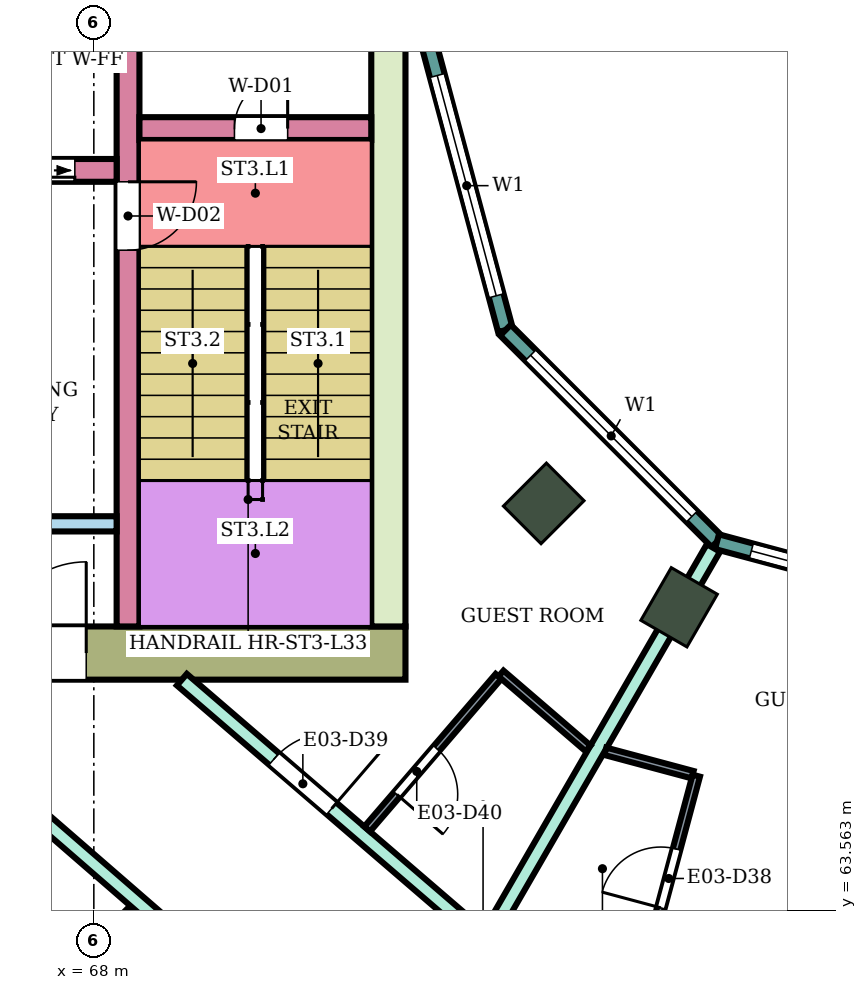
"""IFC4 building model, lengths in metres.
Left out: names, types, materials, properties, quantities, classifications, styles, units other than length and angle.
Written with IfcOpenShell. Run it as: python <this file> out.ifc"""

import sys

from ifc_helpers import new_model, si_unit, direction, frame, frame_2d, origin, origin_2d, place, context, subcontext, project, spatial, rectangle, extrude, element, fill, save


model = new_model("IFC4")
c1 = context("Model", 3, precision=1e-05, world=origin(), true_north=direction((0.0, 1.0)))
c2 = subcontext(c1, "Body", "Model", "MODEL_VIEW")
j1 = project(units=[si_unit("LENGTHUNIT", "METRE"), si_unit("PLANEANGLEUNIT", "RADIAN")], contexts=[c1])
p1 = place(None, origin())
s1 = spatial("IfcSite", under=j1, at=p1, CompositionType="ELEMENT")
p2 = place(p1, origin())
s2 = spatial("IfcBuilding", under=s1, at=p2, CompositionType="ELEMENT")
p3 = place(p2, frame((0.0, 0.0, 141.9)))
s3 = spatial("IfcBuildingStorey", under=s2, at=p3, CompositionType="ELEMENT", Elevation=141.9)
for number, where, z_axis, x_axis in (
    (1, (73.919, 68.919, 0.0), (0.0, 0.0, 1.0), (-0.707, -0.707, 0.0)),
    (2, (75.7, 67.552, 0.0), (0.0, 0.0, 1.0), (-0.5, -0.866, 0.0)),
):
    element("IfcColumn", number, at=place(p3, frame(where, z_axis=z_axis, x_axis=x_axis)), inside=s3, PredefinedType="COLUMN", context=c2, shape_type="SweptSolid", body=[
        extrude(rectangle(XDim=0.8, YDim=0.7, at=origin_2d()), origin(), (0.0, 0.0, 1.0), 3.9),
    ])
p4 = place(p3, frame((72.1, 66.95, 0.0), z_axis=(0.0, 0.0, 1.0), x_axis=(-1.0, 0.0, 0.0)))
e3 = element("IfcWall", 3, at=p4, inside=s3, PredefinedType="SHEAR", context=c2, shape_type="SweptSolid", body=[
    extrude(rectangle(XDim=14.8, YDim=0.7, at=frame_2d((7.4, 0.0))), origin(), (0.0, 0.0, 1.0), 3.58),
])
p5 = place(p4, frame((4.2, 0.0, 0.0)))
e4 = element("IfcOpeningElement", 4, at=p5, cuts=e3, PredefinedType="OPENING", context=c2, shape_type="SweptSolid", body=[
    extrude(rectangle(XDim=2.4, YDim=2.4, at=frame_2d((1.2, 1.2))), frame((0.0, 0.36, 0.0), z_axis=(0.0, -1.0, 0.0), x_axis=(1.0, 0.0, 0.0)), (0.0, 0.0, 1.0), 0.72),
])
p6 = place(p3, frame((71.875, 75.0, 0.0), z_axis=(0.0, 0.0, 1.0), x_axis=(0.0, -1.0, 0.0)))
e5 = element("IfcWall", 5, at=p6, inside=s3, PredefinedType="SHEAR", context=c2, shape_type="SweptSolid", body=[
    extrude(rectangle(XDim=7.7, YDim=0.45, at=frame_2d((3.85, 0.0))), origin(), (0.0, 0.0, 1.0), 3.58),
])
p7 = place(p3, frame((68.45, 75.0, 0.0), z_axis=(0.0, 0.0, 1.0), x_axis=(0.0, -1.0, 0.0)))
e6 = element("IfcWall", 6, at=p7, inside=s3, PredefinedType="SHEAR", context=c2, shape_type="SweptSolid", body=[
    extrude(rectangle(XDim=7.7, YDim=0.3, at=frame_2d((3.85, 0.0))), origin(), (0.0, 0.0, 1.0), 3.58),
])
p8 = place(p7, frame((1.85, 0.0, 0.0)))
e7 = element("IfcOpeningElement", 7, at=p8, cuts=e6, PredefinedType="OPENING", context=c2, shape_type="SweptSolid", body=[
    extrude(rectangle(XDim=0.9, YDim=2.1, at=frame_2d((0.45, 1.05))), frame((0.0, 0.16, 0.0), z_axis=(0.0, -1.0, 0.0), x_axis=(1.0, 0.0, 0.0)), (0.0, 0.0, 1.0), 0.32),
])
p9 = place(p3, frame((71.65, 73.85, 0.0), z_axis=(0.0, 0.0, 1.0), x_axis=(-1.0, 0.0, 0.0)))
e8 = element("IfcWall", 8, at=p9, inside=s3, PredefinedType="SHEAR", context=c2, shape_type="SweptSolid", body=[
    extrude(rectangle(XDim=3.05, YDim=0.3, at=frame_2d((1.525, 0.0))), origin(), (0.0, 0.0, 1.0), 3.58),
])
p10 = place(p9, frame((1.1, 0.0, 0.0)))
e9 = element("IfcOpeningElement", 9, at=p10, cuts=e8, PredefinedType="OPENING", context=c2, shape_type="SweptSolid", body=[
    extrude(rectangle(XDim=0.7, YDim=2.0, at=frame_2d((0.35, 1.0))), frame((0.0, 0.16, 0.0), z_axis=(0.0, -1.0, 0.0), x_axis=(1.0, 0.0, 0.0)), (0.0, 0.0, 1.0), 0.32),
])
p11 = place(p3, frame((68.3, 73.3, 0.0), z_axis=(0.0, 0.0, 1.0), x_axis=(-1.0, 0.0, 0.0)))
e10 = element("IfcWall", 10, at=p11, inside=s3, PredefinedType="SHEAR", context=c2, shape_type="SweptSolid", body=[
    extrude(rectangle(XDim=11.0, YDim=0.3, at=frame_2d((5.5, 0.0))), origin(), (0.0, 0.0, 1.0), 3.58),
])
p12 = place(p11, frame((0.55, 0.0, 0.0)))
e11 = element("IfcOpeningElement", 11, at=p12, cuts=e10, PredefinedType="OPENING", context=c2, shape_type="SweptSolid", body=[
    extrude(rectangle(XDim=1.1, YDim=2.1, at=frame_2d((0.55, 1.05))), frame((0.0, 0.16, 0.0), z_axis=(0.0, -1.0, 0.0), x_axis=(1.0, 0.0, 0.0)), (0.0, 0.0, 1.0), 0.32),
])
p13 = place(p11, frame((8.1, 0.0, 0.0)))
e12 = element("IfcOpeningElement", 12, at=p13, cuts=e10, PredefinedType="OPENING", context=c2, shape_type="SweptSolid", body=[
    extrude(rectangle(XDim=1.0, YDim=2.1, at=frame_2d((0.5, 1.05))), frame((0.0, 0.16, 0.0), z_axis=(0.0, -1.0, 0.0), x_axis=(1.0, 0.0, 0.0)), (0.0, 0.0, 1.0), 0.32),
])
p14 = place(p3, frame((68.3, 68.65, 0.0), z_axis=(0.0, 0.0, 1.0), x_axis=(-1.0, 0.0, 0.0)))
e13 = element("IfcWall", 13, at=p14, inside=s3, PredefinedType="SHEAR", context=c2, shape_type="SweptSolid", body=[
    extrude(rectangle(XDim=4.5, YDim=0.2, at=frame_2d((2.25, 0.0))), origin(), (0.0, 0.0, 1.0), 3.58),
])
p15 = place(p3, frame((72.396, 75.0, 0.0), z_axis=(0.0, 0.0, 1.0), x_axis=(0.258789828301, -0.965933654434, 0.0)))
e14 = element("IfcWall", 14, at=p15, inside=s3, PredefinedType="NOTDEFINED", context=c2, shape_type="SweptSolid", body=[
    extrude(rectangle(XDim=3.936, YDim=0.2, at=frame_2d((1.968, 0.0))), origin(), (0.0, 0.0, 1.0), 3.9),
])
p16 = place(p15, frame((0.468, 0.0, 0.9)))
e15 = element("IfcOpeningElement", 15, at=p16, cuts=e14, PredefinedType="OPENING", context=c2, shape_type="SweptSolid", body=[
    extrude(rectangle(XDim=3.0, YDim=2.3, at=frame_2d((1.5, 1.15))), frame((0.0, 0.11, 0.0), z_axis=(0.0, -1.0, 0.0), x_axis=(1.0, 0.0, 0.0)), (0.0, 0.0, 1.0), 0.22),
])
p17 = place(p3, frame((73.415, 71.198, 0.0), z_axis=(0.0, 0.0, 1.0), x_axis=(0.707106781187, -0.707106781187, 0.0)))
e16 = element("IfcWall", 16, at=p17, inside=s3, PredefinedType="NOTDEFINED", context=c2, shape_type="SweptSolid", body=[
    extrude(rectangle(XDim=3.936, YDim=0.2, at=frame_2d((1.968, 0.0))), origin(), (0.0, 0.0, 1.0), 3.9),
])
p18 = place(p17, frame((0.468, 0.0, 0.9)))
e17 = element("IfcOpeningElement", 17, at=p18, cuts=e16, PredefinedType="OPENING", context=c2, shape_type="SweptSolid", body=[
    extrude(rectangle(XDim=3.0, YDim=2.3, at=frame_2d((1.5, 1.15))), frame((0.0, 0.11, 0.0), z_axis=(0.0, -1.0, 0.0), x_axis=(1.0, 0.0, 0.0)), (0.0, 0.0, 1.0), 0.22),
])
p19 = place(p3, frame((76.198, 68.415, 0.0), z_axis=(0.0, 0.0, 1.0), x_axis=(0.965933654434, -0.258789828301, 0.0)))
e18 = element("IfcWall", 18, at=p19, inside=s3, PredefinedType="NOTDEFINED", context=c2, shape_type="SweptSolid", body=[
    extrude(rectangle(XDim=3.936, YDim=0.2, at=frame_2d((1.968, 0.0))), origin(), (0.0, 0.0, 1.0), 3.9),
])
p20 = place(p19, frame((0.468, 0.0, 0.9)))
e19 = element("IfcOpeningElement", 19, at=p20, cuts=e18, PredefinedType="OPENING", context=c2, shape_type="SweptSolid", body=[
    extrude(rectangle(XDim=3.0, YDim=2.3, at=frame_2d((1.5, 1.15))), frame((0.0, 0.11, 0.0), z_axis=(0.0, -1.0, 0.0), x_axis=(1.0, 0.0, 0.0)), (0.0, 0.0, 1.0), 0.22),
])
p21 = place(p3, frame((63.593, 58.599, 0.0), z_axis=(0.0, 0.0, 1.0), x_axis=(0.707228748718, 0.706984792613, 0.0)))
e20 = element("IfcWall", 20, at=p21, inside=s3, PredefinedType="PARTITIONING", context=c2, shape_type="SweptSolid", body=[
    extrude(rectangle(XDim=7.005, YDim=0.2, at=frame_2d((3.503, 0.0))), origin(), (0.0, 0.0, 1.0), 3.45),
])
p22 = place(p3, frame((67.082, 64.972, 0.0), z_axis=(0.0, 0.0, 1.0), x_axis=(0.755031061605, -0.65568902386, 0.0)))
e21 = element("IfcWall", 21, at=p22, inside=s3, PredefinedType="PARTITIONING", context=c2, shape_type="SweptSolid", body=[
    extrude(rectangle(XDim=6.186, YDim=0.2, at=frame_2d((3.093, 0.0))), origin(), (0.0, 0.0, 1.0), 3.45),
])
p23 = place(p22, frame((4.755, 0.0, 0.0)))
e22 = element("IfcOpeningElement", 22, at=p23, cuts=e21, PredefinedType="OPENING", context=c2, shape_type="SweptSolid", body=[
    extrude(rectangle(XDim=1.0, YDim=2.1, at=frame_2d((0.5, 1.05))), frame((0.0, 0.11, 0.0), z_axis=(0.0, -1.0, 0.0), x_axis=(1.0, 0.0, 0.0)), (0.0, 0.0, 1.0), 0.22),
])
p24 = place(p3, frame((69.158, 66.6, 0.0), z_axis=(0.0, 0.0, 1.0), x_axis=(0.757976058094, -0.652282373943, 0.0)))
e23 = element("IfcWall", 23, at=p24, inside=s3, PredefinedType="PARTITIONING", context=c2, shape_type="SweptSolid", body=[
    extrude(rectangle(XDim=5.16, YDim=0.2, at=frame_2d((2.58, 0.0))), origin(), (0.0, 0.0, 1.0), 3.45),
])
p25 = place(p24, frame((1.6, 0.0, 0.0)))
e24 = element("IfcOpeningElement", 24, at=p25, cuts=e23, PredefinedType="OPENING", context=c2, shape_type="SweptSolid", body=[
    extrude(rectangle(XDim=1.0, YDim=2.1, at=frame_2d((0.5, 1.05))), frame((0.0, 0.11, 0.0), z_axis=(0.0, -1.0, 0.0), x_axis=(1.0, 0.0, 0.0)), (0.0, 0.0, 1.0), 0.22),
])
p26 = place(p3, frame((73.173, 63.176, 0.0), z_axis=(0.0, 0.0, 1.0), x_axis=(0.500239348149, 0.865887171959, 0.0)))
e25 = element("IfcWall", 25, at=p26, inside=s3, PredefinedType="PARTITIONING", context=c2, shape_type="SweptSolid", body=[
    extrude(rectangle(XDim=5.955, YDim=0.2, at=frame_2d((2.978, 0.0))), origin(), (0.0, 0.0, 1.0), 3.45),
])
p27 = place(p3, frame((71.596, 64.635, 0.0), z_axis=(0.0, 0.0, 1.0), x_axis=(0.652285007511, 0.757973791748, 0.0)))
e26 = element("IfcWall", 26, at=p27, inside=s3, PredefinedType="PARTITIONING", context=c2, shape_type="SweptSolid", body=[
    extrude(rectangle(XDim=2.65, YDim=0.1, at=frame_2d((1.325, 0.0))), origin(), (0.0, 0.0, 1.0), 3.45),
])
p28 = place(p27, frame((0.6, 0.0, 0.0)))
e27 = element("IfcOpeningElement", 27, at=p28, cuts=e26, PredefinedType="OPENING", context=c2, shape_type="SweptSolid", body=[
    extrude(rectangle(XDim=0.8, YDim=2.1, at=frame_2d((0.4, 1.05))), frame((0.0, 0.06, 0.0), z_axis=(0.0, -1.0, 0.0), x_axis=(1.0, 0.0, 0.0)), (0.0, 0.0, 1.0), 0.12),
])
p29 = place(p3, frame((73.357, 66.681, 0.0), z_axis=(0.0, 0.0, 1.0), x_axis=(0.758263469747, -0.651948242154, 0.0)))
e28 = element("IfcWall", 28, at=p29, inside=s3, PredefinedType="PARTITIONING", context=c2, shape_type="SweptSolid", body=[
    extrude(rectangle(XDim=1.511, YDim=0.1, at=frame_2d((0.755, 0.0))), origin(), (0.0, 0.0, 1.0), 3.45),
])
p30 = place(p3, frame((74.729, 65.657, 0.0), z_axis=(0.0, 0.0, 1.0), x_axis=(0.965948051503, -0.258736085224, 0.0)))
e29 = element("IfcWall", 29, at=p30, inside=s3, PredefinedType="PARTITIONING", context=c2, shape_type="SweptSolid", body=[
    extrude(rectangle(XDim=1.189, YDim=0.1, at=frame_2d((0.594, 0.0))), origin(), (0.0, 0.0, 1.0), 3.45),
])
p31 = place(p3, frame((75.227, 62.729, 0.0), z_axis=(0.0, 0.0, 1.0), x_axis=(0.258945475746, 0.965891940432, 0.0)))
e30 = element("IfcWall", 30, at=p31, inside=s3, PredefinedType="PARTITIONING", context=c2, shape_type="SweptSolid", body=[
    extrude(rectangle(XDim=2.7, YDim=0.1, at=frame_2d((1.35, 0.0))), origin(), (0.0, 0.0, 1.0), 3.45),
])
p32 = place(p31, frame((0.9, 0.0, 0.0)))
e31 = element("IfcOpeningElement", 31, at=p32, cuts=e30, PredefinedType="OPENING", context=c2, shape_type="SweptSolid", body=[
    extrude(rectangle(XDim=0.8, YDim=2.1, at=frame_2d((0.4, 1.05))), frame((0.0, 0.06, 0.0), z_axis=(0.0, -1.0, 0.0), x_axis=(1.0, 0.0, 0.0)), (0.0, 0.0, 1.0), 0.12),
])
p33 = place(p16, origin())
e32 = element("IfcWindow", 32, at=p33, inside=s3, PartitioningType="SINGLE_PANEL", PredefinedType="WINDOW", context=c2, shape_type="SweptSolid", body=[
    extrude(rectangle(XDim=3.0, YDim=2.3, at=frame_2d((1.5, 1.15))), frame((0.0, 0.03, 0.0), z_axis=(0.0, -1.0, 0.0), x_axis=(1.0, 0.0, 0.0)), (0.0, 0.0, 1.0), 0.06),
])
fill(e15, e32)
p34 = place(p18, origin())
e33 = element("IfcWindow", 33, at=p34, inside=s3, PartitioningType="SINGLE_PANEL", PredefinedType="WINDOW", context=c2, shape_type="SweptSolid", body=[
    extrude(rectangle(XDim=3.0, YDim=2.3, at=frame_2d((1.5, 1.15))), frame((0.0, 0.03, 0.0), z_axis=(0.0, -1.0, 0.0), x_axis=(1.0, 0.0, 0.0)), (0.0, 0.0, 1.0), 0.06),
])
fill(e17, e33)
p35 = place(p20, origin())
e34 = element("IfcWindow", 34, at=p35, inside=s3, PartitioningType="SINGLE_PANEL", PredefinedType="WINDOW", context=c2, shape_type="SweptSolid", body=[
    extrude(rectangle(XDim=3.0, YDim=2.3, at=frame_2d((1.5, 1.15))), frame((0.0, 0.03, 0.0), z_axis=(0.0, -1.0, 0.0), x_axis=(1.0, 0.0, 0.0)), (0.0, 0.0, 1.0), 0.06),
])
fill(e19, e34)
p36 = place(p32, origin())
e35 = element("IfcDoor", 35, at=p36, inside=s3, OperationType="SINGLE_SWING_LEFT", PredefinedType="DOOR", context=c2, shape_type="SweptSolid", body=[
    extrude(rectangle(XDim=0.8, YDim=2.1, at=frame_2d((0.4, 1.05))), frame((0.0, 0.025, 0.0), z_axis=(0.0, -1.0, 0.0), x_axis=(1.0, 0.0, 0.0)), (0.0, 0.0, 1.0), 0.05),
])
fill(e31, e35)
p37 = place(p25, origin())
e36 = element("IfcDoor", 36, at=p37, inside=s3, OperationType="SINGLE_SWING_RIGHT", PredefinedType="DOOR", context=c2, shape_type="SweptSolid", body=[
    extrude(rectangle(XDim=1.0, YDim=2.1, at=frame_2d((0.5, 1.05))), frame((0.0, 0.025, 0.0), z_axis=(0.0, -1.0, 0.0), x_axis=(1.0, 0.0, 0.0)), (0.0, 0.0, 1.0), 0.05),
])
fill(e24, e36)
p38 = place(p28, frame((0.8, 0.0, 0.0), z_axis=(0.0, 0.0, 1.0), x_axis=(-1.0, 0.0, 0.0)))
e37 = element("IfcDoor", 37, at=p38, inside=s3, OperationType="SINGLE_SWING_RIGHT", PredefinedType="DOOR", context=c2, shape_type="SweptSolid", body=[
    extrude(rectangle(XDim=0.8, YDim=2.1, at=frame_2d((0.4, 1.05))), frame((0.0, 0.025, 0.0), z_axis=(0.0, -1.0, 0.0), x_axis=(1.0, 0.0, 0.0)), (0.0, 0.0, 1.0), 0.05),
])
fill(e27, e37)
p39 = place(p10, frame((0.7, 0.0, 0.0), z_axis=(0.0, 0.0, 1.0), x_axis=(-1.0, 0.0, 0.0)))
e38 = element("IfcDoor", 38, at=p39, inside=s3, OperationType="SINGLE_SWING_RIGHT", PredefinedType="DOOR", context=c2, shape_type="SweptSolid", body=[
    extrude(rectangle(XDim=0.7, YDim=2.0, at=frame_2d((0.35, 1.0))), frame((0.0, 0.025, 0.0), z_axis=(0.0, -1.0, 0.0), x_axis=(1.0, 0.0, 0.0)), (0.0, 0.0, 1.0), 0.05),
])
fill(e9, e38)
p40 = place(p8, origin())
e39 = element("IfcDoor", 39, at=p40, inside=s3, OperationType="SINGLE_SWING_LEFT", PredefinedType="DOOR", context=c2, shape_type="SweptSolid", body=[
    extrude(rectangle(XDim=0.9, YDim=2.1, at=frame_2d((0.45, 1.05))), frame((0.0, 0.025, 0.0), z_axis=(0.0, -1.0, 0.0), x_axis=(1.0, 0.0, 0.0)), (0.0, 0.0, 1.0), 0.05),
])
fill(e7, e39)
p41 = place(p12, origin())
e40 = element("IfcDoor", 40, at=p41, inside=s3, OperationType="DOUBLE_DOOR_SLIDING", PredefinedType="DOOR", context=c2, shape_type="SweptSolid", body=[
    extrude(rectangle(XDim=1.1, YDim=2.1, at=frame_2d((0.55, 1.05))), frame((0.0, 0.025, 0.0), z_axis=(0.0, -1.0, 0.0), x_axis=(1.0, 0.0, 0.0)), (0.0, 0.0, 1.0), 0.05),
])
fill(e11, e40)
p42 = place(p5, frame((2.4, 0.0, 0.0), z_axis=(0.0, 0.0, 1.0), x_axis=(-1.0, 0.0, 0.0)))
e41 = element("IfcDoor", 41, at=p42, inside=s3, OperationType="DOUBLE_DOOR_SINGLE_SWING", PredefinedType="DOOR", context=c2, shape_type="SweptSolid", body=[
    extrude(rectangle(XDim=2.4, YDim=2.4, at=frame_2d((1.2, 1.2))), frame((0.0, 0.025, 0.0), z_axis=(0.0, -1.0, 0.0), x_axis=(1.0, 0.0, 0.0)), (0.0, 0.0, 1.0), 0.05),
])
fill(e4, e41)
save(model, sys.argv[1])
